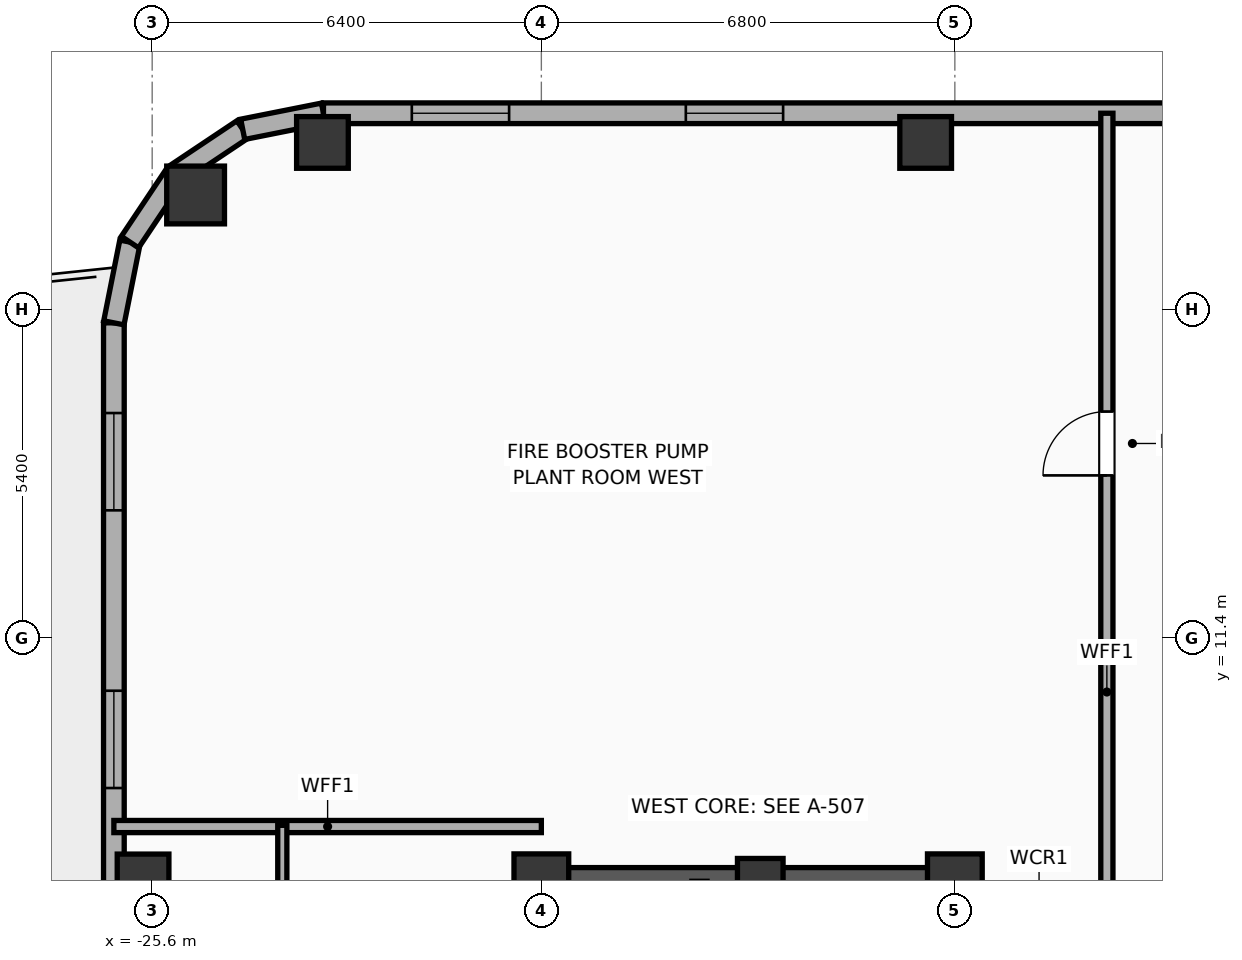
"""IFC4 building model, lengths in metres.
Left out: names, types, materials, properties, quantities, classifications, styles, units other than length and angle.
Written with IfcOpenShell. Run it as: python <this file> out.ifc"""

import sys

from ifc_helpers import new_model, si_unit, direction, frame, frame_2d, origin, origin_2d, place, context, subcontext, project, spatial, rectangle, hollow_rectangle, hollow_circle, extrude, element, fill, save


model = new_model("IFC4")
c1 = context("Model", 3, precision=1e-05, world=origin(), true_north=direction((0.0, 1.0)))
c2 = subcontext(c1, "Body", "Model", "MODEL_VIEW")
j1 = project(units=[si_unit("LENGTHUNIT", "METRE"), si_unit("PLANEANGLEUNIT", "RADIAN")], contexts=[c1])
p1 = place(None, origin())
s1 = spatial("IfcSite", under=j1, at=p1, CompositionType="ELEMENT")
p2 = place(p1, origin())
s2 = spatial("IfcBuilding", under=s1, at=p2, CompositionType="ELEMENT")
p3 = place(p2, frame((0.0, 0.0, 195.0)))
s3 = spatial("IfcBuildingStorey", under=s2, at=p3, CompositionType="ELEMENT", Elevation=195.0)
p4 = place(p3, frame((-19.2, 7.4, 0.0), z_axis=(0.0, 0.0, 1.0), x_axis=(1.0, 0.0, 0.0)))
e1 = element("IfcColumn", 1, at=p4, inside=s3, PredefinedType="COLUMN", context=c2, shape_type="SweptSolid", body=[
    extrude(rectangle(XDim=0.9, YDim=0.9, at=origin_2d()), origin(), (0.0, 0.0, 1.0), 5.2),
])
p5 = place(p3, frame((-15.6, 7.4, 0.0), z_axis=(0.0, 0.0, 1.0), x_axis=(1.0, 0.0, 0.0)))
e2 = element("IfcColumn", 2, at=p5, inside=s3, PredefinedType="COLUMN", context=c2, shape_type="SweptSolid", body=[
    extrude(rectangle(XDim=0.75, YDim=0.75, at=origin_2d()), origin(), (0.0, 0.0, 1.0), 5.2),
])
p6 = place(p3, frame((-12.4, 7.4, 0.0), z_axis=(0.0, 0.0, 1.0), x_axis=(1.0, 0.0, 0.0)))
e3 = element("IfcColumn", 3, at=p6, inside=s3, PredefinedType="COLUMN", context=c2, shape_type="SweptSolid", body=[
    extrude(rectangle(XDim=0.9, YDim=0.9, at=origin_2d()), origin(), (0.0, 0.0, 1.0), 5.2),
])
p7 = place(p3, frame((-19.425, 7.4, 0.0), z_axis=(0.0, 0.0, 1.0), x_axis=(1.0, 0.0, 0.0)))
e4 = element("IfcWall", 4, at=p7, inside=s3, PredefinedType="SHEAR", context=c2, shape_type="SweptSolid", body=[
    extrude(rectangle(XDim=7.25, YDim=0.45, at=frame_2d((3.625, 0.0))), origin(), (0.0, 0.0, 1.0), 4.8),
])
for number, where, z_axis, x_axis in (
    (5, (-12.88, 19.55, -0.4), (0.0, 0.0, 1.0), (1.0, 0.0, 0.0)),
    (6, (-22.8, 19.55, -0.4), (0.0, 0.0, 1.0), (1.0, 0.0, 0.0)),
):
    element("IfcColumn", number, at=place(p3, frame(where, z_axis=z_axis, x_axis=x_axis)), inside=s3, PredefinedType="COLUMN", context=c2, shape_type="SweptSolid", body=[
        extrude(hollow_rectangle(XDim=0.85, YDim=0.85, WallThickness=0.028, at=origin_2d()), origin(), (0.0, 0.0, 1.0), 5.6),
    ])
p8 = place(p3, frame((-24.886, 18.686, -0.4), z_axis=(0.0, 0.0, 1.0), x_axis=(1.0, 0.0, 0.0)))
e7 = element("IfcColumn", 7, at=p8, inside=s3, PredefinedType="COLUMN", context=c2, shape_type="SweptSolid", body=[
    extrude(hollow_circle(Radius=0.475, WallThickness=0.032, at=origin_2d()), origin(), (0.0, 0.0, 1.0), 5.6),
])
p9 = place(p3, frame((-25.75, 7.422, -0.4), z_axis=(0.0, 0.0, 1.0), x_axis=(1.0, 0.0, 0.0)))
e8 = element("IfcColumn", 8, at=p9, inside=s3, PredefinedType="COLUMN", context=c2, shape_type="SweptSolid", body=[
    extrude(hollow_rectangle(XDim=0.85, YDim=0.85, WallThickness=0.028, at=origin_2d()), origin(), (0.0, 0.0, 1.0), 5.6),
])
p10 = place(p3, frame((-26.23, -15.383, 0.0), z_axis=(0.0, 0.0, 1.0), x_axis=(0.0, 1.0, 0.0)))
e9 = element("IfcWall", 9, at=p10, inside=s3, PredefinedType="ELEMENTEDWALL", context=c2, shape_type="SweptSolid", body=[
    extrude(rectangle(XDim=31.967, YDim=0.34, at=frame_2d((15.983, 0.0))), origin(), (0.0, 0.0, 1.0), 3.69),
])
p11 = place(p10, frame((1.483, 0.0, 0.0)))
e10 = element("IfcOpeningElement", 10, at=p11, cuts=e9, PredefinedType="OPENING", context=c2, shape_type="SweptSolid", body=[
    extrude(rectangle(XDim=1.5, YDim=2.05, at=frame_2d((0.75, 1.025))), frame((0.0, 0.18, 0.0), z_axis=(0.0, -1.0, 0.0), x_axis=(1.0, 0.0, 0.0)), (0.0, 0.0, 1.0), 0.36),
])
p12 = place(p10, frame((6.05, 0.0, 0.75)))
e11 = element("IfcOpeningElement", 11, at=p12, cuts=e9, PredefinedType="OPENING", context=c2, shape_type="SweptSolid", body=[
    extrude(rectangle(XDim=1.6, YDim=1.4, at=frame_2d((0.8, 0.7))), frame((0.0, 0.18, 0.0), z_axis=(0.0, -1.0, 0.0), x_axis=(1.0, 0.0, 0.0)), (0.0, 0.0, 1.0), 0.36),
])
p13 = place(p10, frame((10.617, 0.0, 0.75)))
e12 = element("IfcOpeningElement", 12, at=p13, cuts=e9, PredefinedType="OPENING", context=c2, shape_type="SweptSolid", body=[
    extrude(rectangle(XDim=1.6, YDim=1.4, at=frame_2d((0.8, 0.7))), frame((0.0, 0.18, 0.0), z_axis=(0.0, -1.0, 0.0), x_axis=(1.0, 0.0, 0.0)), (0.0, 0.0, 1.0), 0.36),
])
p14 = place(p10, frame((19.75, 0.0, 0.75)))
e13 = element("IfcOpeningElement", 13, at=p14, cuts=e9, PredefinedType="OPENING", context=c2, shape_type="SweptSolid", body=[
    extrude(rectangle(XDim=1.6, YDim=1.4, at=frame_2d((0.8, 0.7))), frame((0.0, 0.18, 0.0), z_axis=(0.0, -1.0, 0.0), x_axis=(1.0, 0.0, 0.0)), (0.0, 0.0, 1.0), 0.36),
])
p15 = place(p10, frame((24.317, 0.0, 0.75)))
e14 = element("IfcOpeningElement", 14, at=p15, cuts=e9, PredefinedType="OPENING", context=c2, shape_type="SweptSolid", body=[
    extrude(rectangle(XDim=1.6, YDim=1.4, at=frame_2d((0.8, 0.7))), frame((0.0, 0.18, 0.0), z_axis=(0.0, -1.0, 0.0), x_axis=(1.0, 0.0, 0.0)), (0.0, 0.0, 1.0), 0.36),
])
p16 = place(p10, frame((28.883, 0.0, 0.75)))
e15 = element("IfcOpeningElement", 15, at=p16, cuts=e9, PredefinedType="OPENING", context=c2, shape_type="SweptSolid", body=[
    extrude(rectangle(XDim=1.6, YDim=1.4, at=frame_2d((0.8, 0.7))), frame((0.0, 0.18, 0.0), z_axis=(0.0, -1.0, 0.0), x_axis=(1.0, 0.0, 0.0)), (0.0, 0.0, 1.0), 0.36),
])
p17 = place(p3, frame((-26.23, 16.583, 0.0), z_axis=(0.0, 0.0, 1.0), x_axis=(0.195075878998, 0.980788153188, 0.0)))
e16 = element("IfcWall", 16, at=p17, inside=s3, PredefinedType="ELEMENTEDWALL", context=c2, shape_type="SweptSolid", body=[
    extrude(rectangle(XDim=1.354, YDim=0.34, at=frame_2d((0.677, 0.0))), origin(), (0.0, 0.0, 1.0), 4.8),
])
p18 = place(p3, frame((-25.966, 17.911, 0.0), z_axis=(0.0, 0.0, 1.0), x_axis=(0.555669034571, 0.831403586725, 0.0)))
e17 = element("IfcWall", 17, at=p18, inside=s3, PredefinedType="ELEMENTEDWALL", context=c2, shape_type="SweptSolid", body=[
    extrude(rectangle(XDim=1.337, YDim=0.34, at=frame_2d((0.668, 0.0))), origin(), (0.0, 0.0, 1.0), 4.8),
])
p19 = place(p3, frame((-25.223, 19.023, 0.0), z_axis=(0.0, 0.0, 1.0), x_axis=(0.831403586725, 0.555669034571, 0.0)))
e18 = element("IfcWall", 18, at=p19, inside=s3, PredefinedType="ELEMENTEDWALL", context=c2, shape_type="SweptSolid", body=[
    extrude(rectangle(XDim=1.337, YDim=0.34, at=frame_2d((0.668, 0.0))), origin(), (0.0, 0.0, 1.0), 3.69),
])
p20 = place(p3, frame((-24.111, 19.766, 0.0), z_axis=(0.0, 0.0, 1.0), x_axis=(0.980788153188, 0.195075878998, 0.0)))
e19 = element("IfcWall", 19, at=p20, inside=s3, PredefinedType="ELEMENTEDWALL", context=c2, shape_type="SweptSolid", body=[
    extrude(rectangle(XDim=1.354, YDim=0.34, at=frame_2d((0.677, 0.0))), origin(), (0.0, 0.0, 1.0), 3.69),
])
p21 = place(p3, frame((-22.783, 20.03, 0.0), z_axis=(0.0, 0.0, 1.0), x_axis=(1.0, 0.0, 0.0)))
e20 = element("IfcWall", 20, at=p21, inside=s3, PredefinedType="ELEMENTEDWALL", context=c2, shape_type="SweptSolid", body=[
    extrude(rectangle(XDim=49.566, YDim=0.34, at=frame_2d((24.783, 0.0))), origin(), (0.0, 0.0, 1.0), 3.69),
])
p22 = place(p21, frame((1.453, 0.0, 0.75)))
e21 = element("IfcOpeningElement", 21, at=p22, cuts=e20, PredefinedType="OPENING", context=c2, shape_type="SweptSolid", body=[
    extrude(rectangle(XDim=1.6, YDim=1.4, at=frame_2d((0.8, 0.7))), frame((0.0, 0.18, 0.0), z_axis=(0.0, -1.0, 0.0), x_axis=(1.0, 0.0, 0.0)), (0.0, 0.0, 1.0), 0.36),
])
p23 = place(p21, frame((5.959, 0.0, 0.75)))
e22 = element("IfcOpeningElement", 22, at=p23, cuts=e20, PredefinedType="OPENING", context=c2, shape_type="SweptSolid", body=[
    extrude(rectangle(XDim=1.6, YDim=1.4, at=frame_2d((0.8, 0.7))), frame((0.0, 0.18, 0.0), z_axis=(0.0, -1.0, 0.0), x_axis=(1.0, 0.0, 0.0)), (0.0, 0.0, 1.0), 0.36),
])
p24 = place(p21, frame((14.971, 0.0, 0.75)))
e23 = element("IfcOpeningElement", 23, at=p24, cuts=e20, PredefinedType="OPENING", context=c2, shape_type="SweptSolid", body=[
    extrude(rectangle(XDim=1.6, YDim=1.4, at=frame_2d((0.8, 0.7))), frame((0.0, 0.18, 0.0), z_axis=(0.0, -1.0, 0.0), x_axis=(1.0, 0.0, 0.0)), (0.0, 0.0, 1.0), 0.36),
])
p25 = place(p21, frame((23.983, 0.0, 0.75)))
e24 = element("IfcOpeningElement", 24, at=p25, cuts=e20, PredefinedType="OPENING", context=c2, shape_type="SweptSolid", body=[
    extrude(rectangle(XDim=1.6, YDim=1.4, at=frame_2d((0.8, 0.7))), frame((0.0, 0.18, 0.0), z_axis=(0.0, -1.0, 0.0), x_axis=(1.0, 0.0, 0.0)), (0.0, 0.0, 1.0), 0.36),
])
p26 = place(p21, frame((32.995, 0.0, 0.0)))
e25 = element("IfcOpeningElement", 25, at=p26, cuts=e20, PredefinedType="OPENING", context=c2, shape_type="SweptSolid", body=[
    extrude(rectangle(XDim=1.5, YDim=2.05, at=frame_2d((0.75, 1.025))), frame((0.0, 0.18, 0.0), z_axis=(0.0, -1.0, 0.0), x_axis=(1.0, 0.0, 0.0)), (0.0, 0.0, 1.0), 0.36),
])
p27 = place(p21, frame((42.008, 0.0, 0.75)))
e26 = element("IfcOpeningElement", 26, at=p27, cuts=e20, PredefinedType="OPENING", context=c2, shape_type="SweptSolid", body=[
    extrude(rectangle(XDim=1.6, YDim=1.4, at=frame_2d((0.8, 0.7))), frame((0.0, 0.18, 0.0), z_axis=(0.0, -1.0, 0.0), x_axis=(1.0, 0.0, 0.0)), (0.0, 0.0, 1.0), 0.36),
])
p28 = place(p21, frame((46.514, 0.0, 0.75)))
e27 = element("IfcOpeningElement", 27, at=p28, cuts=e20, PredefinedType="OPENING", context=c2, shape_type="SweptSolid", body=[
    extrude(rectangle(XDim=1.6, YDim=1.4, at=frame_2d((0.8, 0.7))), frame((0.0, 0.18, 0.0), z_axis=(0.0, -1.0, 0.0), x_axis=(1.0, 0.0, 0.0)), (0.0, 0.0, 1.0), 0.36),
])
p29 = place(p3, frame((-26.23, 8.3, 0.0), z_axis=(0.0, 0.0, 1.0), x_axis=(1.0, 0.0, 0.0)))
e28 = element("IfcWall", 28, at=p29, inside=s3, PredefinedType="PARTITIONING", context=c2, shape_type="SweptSolid", body=[
    extrude(rectangle(XDim=7.03, YDim=0.2, at=frame_2d((3.515, 0.0))), origin(), (0.0, 0.0, 1.0), 4.8),
])
p30 = place(p3, frame((-23.46, 4.82, 0.0), z_axis=(0.0, 0.0, 1.0), x_axis=(0.0, 1.0, 0.0)))
e29 = element("IfcWall", 29, at=p30, inside=s3, PredefinedType="PLUMBINGWALL", context=c2, shape_type="SweptSolid", body=[
    extrude(rectangle(XDim=3.5, YDim=0.15, at=frame_2d((1.75, 0.0))), origin(), (0.0, 0.0, 1.0), 4.8),
])
p31 = place(p30, frame((1.25, 0.0, 0.0)))
e30 = element("IfcOpeningElement", 30, at=p31, cuts=e29, PredefinedType="OPENING", context=c2, shape_type="SweptSolid", body=[
    extrude(rectangle(XDim=1.0, YDim=2.05, at=frame_2d((0.5, 1.025))), frame((0.0, 0.085, 0.0), z_axis=(0.0, -1.0, 0.0), x_axis=(1.0, 0.0, 0.0)), (0.0, 0.0, 1.0), 0.17),
])
p32 = place(p3, frame((-9.9, 7.1, 0.0), z_axis=(0.0, 0.0, 1.0), x_axis=(0.0, 1.0, 0.0)))
e31 = element("IfcWall", 31, at=p32, inside=s3, PredefinedType="PARTITIONING", context=c2, shape_type="SweptSolid", body=[
    extrude(rectangle(XDim=12.93, YDim=0.2, at=frame_2d((6.465, 0.0))), origin(), (0.0, 0.0, 1.0), 4.8),
])
p33 = place(p32, frame((6.974, 0.0, 0.0)))
e32 = element("IfcOpeningElement", 32, at=p33, cuts=e31, PredefinedType="OPENING", context=c2, shape_type="SweptSolid", body=[
    extrude(rectangle(XDim=1.05, YDim=2.05, at=frame_2d((0.525, 1.025))), frame((0.0, 0.11, 0.0), z_axis=(0.0, -1.0, 0.0), x_axis=(1.0, 0.0, 0.0)), (0.0, 0.0, 1.0), 0.22),
])
p34 = place(p15, origin())
e33 = element("IfcWindow", 33, at=p34, inside=s3, PartitioningType="SINGLE_PANEL", PredefinedType="WINDOW", context=c2, shape_type="SweptSolid", body=[
    extrude(rectangle(XDim=1.6, YDim=1.4, at=frame_2d((0.8, 0.7))), frame((0.0, 0.03, 0.0), z_axis=(0.0, -1.0, 0.0), x_axis=(1.0, 0.0, 0.0)), (0.0, 0.0, 1.0), 0.06),
])
fill(e14, e33)
p35 = place(p16, origin())
e34 = element("IfcWindow", 34, at=p35, inside=s3, PartitioningType="SINGLE_PANEL", PredefinedType="WINDOW", context=c2, shape_type="SweptSolid", body=[
    extrude(rectangle(XDim=1.6, YDim=1.4, at=frame_2d((0.8, 0.7))), frame((0.0, 0.03, 0.0), z_axis=(0.0, -1.0, 0.0), x_axis=(1.0, 0.0, 0.0)), (0.0, 0.0, 1.0), 0.06),
])
fill(e15, e34)
p36 = place(p22, origin())
e35 = element("IfcWindow", 35, at=p36, inside=s3, PartitioningType="SINGLE_PANEL", PredefinedType="WINDOW", context=c2, shape_type="SweptSolid", body=[
    extrude(rectangle(XDim=1.6, YDim=1.4, at=frame_2d((0.8, 0.7))), frame((0.0, 0.03, 0.0), z_axis=(0.0, -1.0, 0.0), x_axis=(1.0, 0.0, 0.0)), (0.0, 0.0, 1.0), 0.06),
])
fill(e21, e35)
p37 = place(p23, origin())
e36 = element("IfcWindow", 36, at=p37, inside=s3, PartitioningType="SINGLE_PANEL", PredefinedType="WINDOW", context=c2, shape_type="SweptSolid", body=[
    extrude(rectangle(XDim=1.6, YDim=1.4, at=frame_2d((0.8, 0.7))), frame((0.0, 0.03, 0.0), z_axis=(0.0, -1.0, 0.0), x_axis=(1.0, 0.0, 0.0)), (0.0, 0.0, 1.0), 0.06),
])
fill(e22, e36)
p38 = place(p33, origin())
e37 = element("IfcDoor", 37, at=p38, inside=s3, OperationType="SINGLE_SWING_LEFT", PredefinedType="DOOR", context=c2, shape_type="SweptSolid", body=[
    extrude(rectangle(XDim=1.05, YDim=2.05, at=frame_2d((0.525, 1.025))), frame((0.0, 0.025, 0.0), z_axis=(0.0, -1.0, 0.0), x_axis=(1.0, 0.0, 0.0)), (0.0, 0.0, 1.0), 0.05),
])
fill(e32, e37)
save(model, sys.argv[1])
